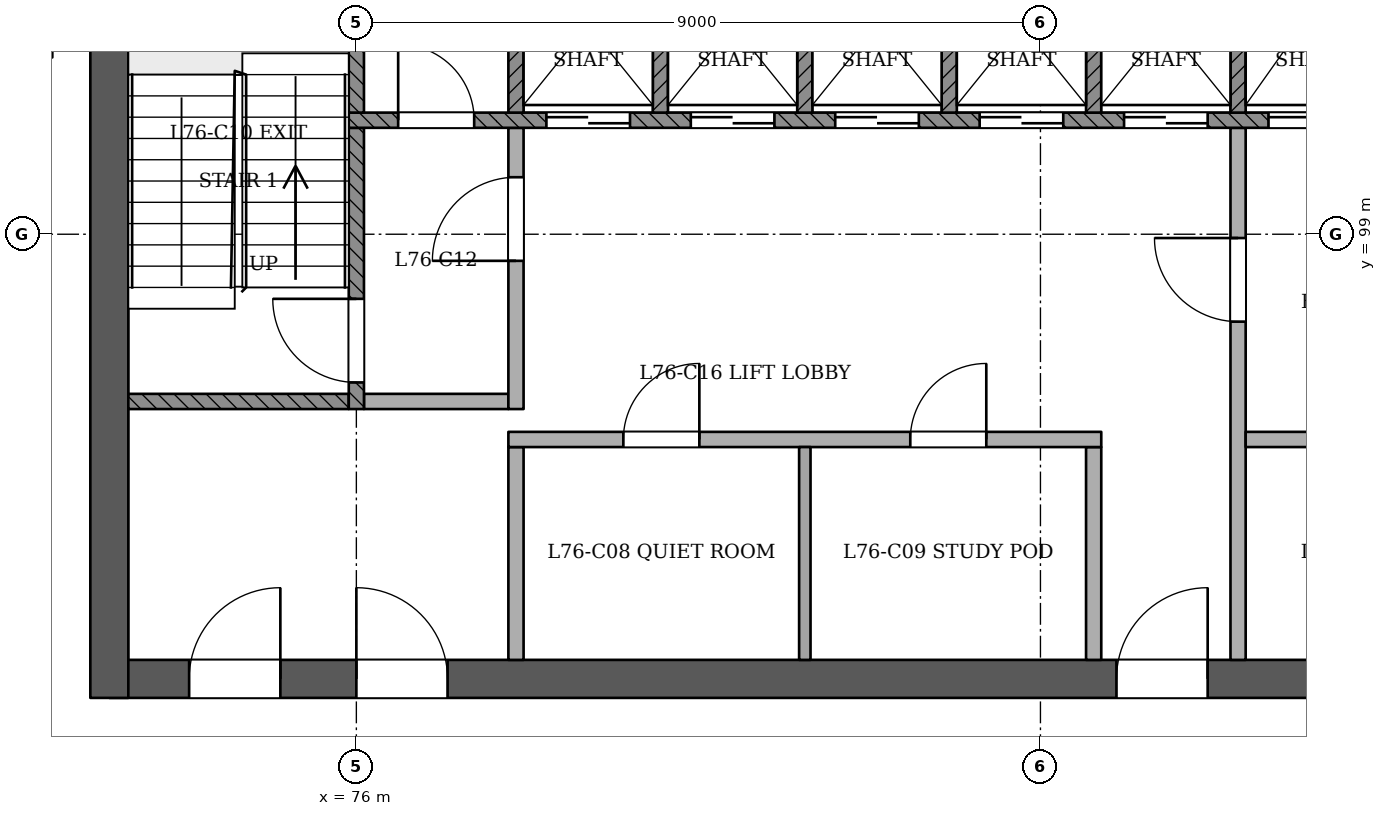
"""IFC4 building model, lengths in metres.
Left out: names, types, materials, properties, quantities, classifications, styles, units other than length and angle.
Written with IfcOpenShell. Run it as: python <this file> out.ifc"""

import sys

from ifc_helpers import new_model, si_unit, direction, frame, frame_2d, origin, place, context, subcontext, project, spatial, rectangle, extrude, element, fill, save


model = new_model("IFC4")
c1 = context("Model", 3, precision=1e-05, world=origin(), true_north=direction((0.0, 1.0)))
c2 = subcontext(c1, "Body", "Model", "MODEL_VIEW")
j1 = project(units=[si_unit("LENGTHUNIT", "METRE"), si_unit("PLANEANGLEUNIT", "RADIAN")], contexts=[c1])
p1 = place(None, origin())
s1 = spatial("IfcSite", under=j1, at=p1, CompositionType="ELEMENT")
p2 = place(p1, origin())
s2 = spatial("IfcBuilding", under=s1, at=p2, CompositionType="ELEMENT")
p3 = place(p2, frame((0.0, 0.0, 295.0)))
s3 = spatial("IfcBuildingStorey", under=s2, at=p3, CompositionType="ELEMENT", Elevation=295.0)
p4 = place(p3, frame((72.75, 93.15, 0.0), z_axis=(0.0, 0.0, 1.0), x_axis=(1.0, 0.0, 0.0)))
e1 = element("IfcWall", 1, at=p4, inside=s3, PredefinedType="SHEAR", context=c2, shape_type="SweptSolid", body=[
    extrude(rectangle(XDim=24.75, YDim=0.5, at=frame_2d((12.375, 0.0))), origin(), (0.0, 0.0, 1.0), 3.6),
])
p5 = place(p4, frame((1.05, 0.0, 0.0)))
e2 = element("IfcOpeningElement", 2, at=p5, cuts=e1, PredefinedType="OPENING", context=c2, shape_type="SweptSolid", body=[
    extrude(rectangle(XDim=1.2, YDim=2.1, at=frame_2d((0.6, 1.05))), frame((0.0, 0.26, 0.0), z_axis=(0.0, -1.0, 0.0), x_axis=(1.0, 0.0, 0.0)), (0.0, 0.0, 1.0), 0.521),
])
p6 = place(p4, frame((3.25, 0.0, 0.0)))
e3 = element("IfcOpeningElement", 3, at=p6, cuts=e1, PredefinedType="OPENING", context=c2, shape_type="SweptSolid", body=[
    extrude(rectangle(XDim=1.2, YDim=2.1, at=frame_2d((0.6, 1.05))), frame((0.0, 0.26, 0.0), z_axis=(0.0, -1.0, 0.0), x_axis=(1.0, 0.0, 0.0)), (0.0, 0.0, 1.0), 0.521),
])
p7 = place(p4, frame((13.25, 0.0, 0.0)))
e4 = element("IfcOpeningElement", 4, at=p7, cuts=e1, PredefinedType="OPENING", context=c2, shape_type="SweptSolid", body=[
    extrude(rectangle(XDim=1.2, YDim=2.1, at=frame_2d((0.6, 1.05))), frame((0.0, 0.26, 0.0), z_axis=(0.0, -1.0, 0.0), x_axis=(1.0, 0.0, 0.0)), (0.0, 0.0, 1.0), 0.521),
])
p8 = place(p4, frame((16.663, 0.0, 0.0)))
e5 = element("IfcOpeningElement", 5, at=p8, cuts=e1, PredefinedType="OPENING", context=c2, shape_type="SweptSolid", body=[
    extrude(rectangle(XDim=1.0, YDim=2.1, at=frame_2d((0.5, 1.05))), frame((0.0, 0.26, 0.0), z_axis=(0.0, -1.0, 0.0), x_axis=(1.0, 0.0, 0.0)), (0.0, 0.0, 1.0), 0.521),
])
p9 = place(p4, frame((20.55, 0.0, 0.0)))
e6 = element("IfcOpeningElement", 6, at=p9, cuts=e1, PredefinedType="OPENING", context=c2, shape_type="SweptSolid", body=[
    extrude(rectangle(XDim=1.0, YDim=2.1, at=frame_2d((0.5, 1.05))), frame((0.0, 0.26, 0.0), z_axis=(0.0, -1.0, 0.0), x_axis=(1.0, 0.0, 0.0)), (0.0, 0.0, 1.0), 0.521),
])
p10 = place(p4, frame((22.988, 0.0, 0.0)))
e7 = element("IfcOpeningElement", 7, at=p10, cuts=e1, PredefinedType="OPENING", context=c2, shape_type="SweptSolid", body=[
    extrude(rectangle(XDim=1.0, YDim=2.1, at=frame_2d((0.5, 1.05))), frame((0.0, 0.26, 0.0), z_axis=(0.0, -1.0, 0.0), x_axis=(1.0, 0.0, 0.0)), (0.0, 0.0, 1.0), 0.521),
])
p11 = place(p3, frame((72.75, 103.65, 0.0), z_axis=(0.0, 0.0, 1.0), x_axis=(0.0, -1.0, 0.0)))
e8 = element("IfcWall", 8, at=p11, inside=s3, PredefinedType="SHEAR", context=c2, shape_type="SweptSolid", body=[
    extrude(rectangle(XDim=10.75, YDim=0.5, at=frame_2d((5.375, 0.0))), origin(), (0.0, 0.0, 1.0), 3.6),
])
p12 = place(p3, frame((72.0, 101.401, 0.0), z_axis=(0.0, 0.0, 1.0), x_axis=(-0.999999989991, -0.000141482738, 0.0)))
e9 = element("IfcWall", 9, at=p12, inside=s3, PredefinedType="PARTITIONING", context=c2, shape_type="SweptSolid", body=[
    extrude(rectangle(XDim=1.726, YDim=0.15, at=frame_2d((0.863, 0.0))), origin(), (0.0, 0.0, 1.0), 3.2),
])
p13 = place(p3, frame((78.1, 93.4, 0.0), z_axis=(0.0, 0.0, 1.0), x_axis=(0.0, 1.0, 0.0)))
e10 = element("IfcWall", 10, at=p13, inside=s3, PredefinedType="PARTITIONING", context=c2, shape_type="SweptSolid", body=[
    extrude(rectangle(XDim=2.8, YDim=0.2, at=frame_2d((1.4, 0.0))), origin(), (0.0, 0.0, 1.0), 3.2),
])
p14 = place(p3, frame((81.9, 93.4, 0.0), z_axis=(0.0, 0.0, 1.0), x_axis=(0.0, 1.0, 0.0)))
e11 = element("IfcWall", 11, at=p14, inside=s3, PredefinedType="PARTITIONING", context=c2, shape_type="SweptSolid", body=[
    extrude(rectangle(XDim=2.8, YDim=0.15, at=frame_2d((1.4, 0.0))), origin(), (0.0, 0.0, 1.0), 3.2),
])
p15 = place(p3, frame((85.7, 93.4, 0.0), z_axis=(0.0, 0.0, 1.0), x_axis=(0.0, 1.0, 0.0)))
e12 = element("IfcWall", 12, at=p15, inside=s3, PredefinedType="PARTITIONING", context=c2, shape_type="SweptSolid", body=[
    extrude(rectangle(XDim=2.8, YDim=0.2, at=frame_2d((1.4, 0.0))), origin(), (0.0, 0.0, 1.0), 3.2),
])
p16 = place(p3, frame((87.6, 93.4, 0.0), z_axis=(0.0, 0.0, 1.0), x_axis=(0.0, 1.0, 0.0)))
e13 = element("IfcWall", 13, at=p16, inside=s3, PredefinedType="PARTITIONING", context=c2, shape_type="SweptSolid", body=[
    extrude(rectangle(XDim=7.0, YDim=0.2, at=frame_2d((3.5, 0.0))), origin(), (0.0, 0.0, 1.0), 3.2),
])
p17 = place(p16, frame((4.45, 0.0, 0.0)))
e14 = element("IfcOpeningElement", 14, at=p17, cuts=e13, PredefinedType="OPENING", context=c2, shape_type="SweptSolid", body=[
    extrude(rectangle(XDim=1.1, YDim=2.1, at=frame_2d((0.55, 1.05))), frame((0.0, 0.11, 0.0), z_axis=(0.0, -1.0, 0.0), x_axis=(1.0, 0.0, 0.0)), (0.0, 0.0, 1.0), 0.221),
])
p18 = place(p3, frame((78.0, 96.3, 0.0), z_axis=(0.0, 0.0, 1.0), x_axis=(1.0, 0.0, 0.0)))
e15 = element("IfcWall", 15, at=p18, inside=s3, PredefinedType="PARTITIONING", context=c2, shape_type="SweptSolid", body=[
    extrude(rectangle(XDim=7.8, YDim=0.2, at=frame_2d((3.9, 0.0))), origin(), (0.0, 0.0, 1.0), 3.2),
])
p19 = place(p18, frame((1.512, 0.0, 0.0)))
e16 = element("IfcOpeningElement", 16, at=p19, cuts=e15, PredefinedType="OPENING", context=c2, shape_type="SweptSolid", body=[
    extrude(rectangle(XDim=1.0, YDim=2.1, at=frame_2d((0.5, 1.05))), frame((0.0, 0.11, 0.0), z_axis=(0.0, -1.0, 0.0), x_axis=(1.0, 0.0, 0.0)), (0.0, 0.0, 1.0), 0.221),
])
p20 = place(p18, frame((5.288, 0.0, 0.0)))
e17 = element("IfcOpeningElement", 17, at=p20, cuts=e15, PredefinedType="OPENING", context=c2, shape_type="SweptSolid", body=[
    extrude(rectangle(XDim=1.0, YDim=2.1, at=frame_2d((0.5, 1.05))), frame((0.0, 0.11, 0.0), z_axis=(0.0, -1.0, 0.0), x_axis=(1.0, 0.0, 0.0)), (0.0, 0.0, 1.0), 0.221),
])
p21 = place(p3, frame((87.7, 96.3, 0.0), z_axis=(0.0, 0.0, 1.0), x_axis=(1.0, 0.0, 0.0)))
e18 = element("IfcWall", 18, at=p21, inside=s3, PredefinedType="PARTITIONING", context=c2, shape_type="SweptSolid", body=[
    extrude(rectangle(XDim=3.6, YDim=0.2, at=frame_2d((1.8, 0.0))), origin(), (0.0, 0.0, 1.0), 3.2),
])
p22 = place(p3, frame((73.0, 96.8, 0.0), z_axis=(0.0, 0.0, 1.0), x_axis=(1.0, 0.0, 0.0)))
e19 = element("IfcWall", 19, at=p22, inside=s3, PredefinedType="SOLIDWALL", context=c2, shape_type="SweptSolid", body=[
    extrude(rectangle(XDim=2.9, YDim=0.2, at=frame_2d((1.45, 0.0))), origin(), (0.0, 0.0, 1.0), 3.2),
])
p23 = place(p3, frame((76.0, 96.7, 0.0), z_axis=(0.0, 0.0, 1.0), x_axis=(0.0, 1.0, 0.0)))
e20 = element("IfcWall", 20, at=p23, inside=s3, PredefinedType="SOLIDWALL", context=c2, shape_type="SweptSolid", body=[
    extrude(rectangle(XDim=3.7, YDim=0.2, at=frame_2d((1.85, 0.0))), origin(), (0.0, 0.0, 1.0), 3.2),
])
p24 = place(p23, frame((0.35, 0.0, 0.0)))
e21 = element("IfcOpeningElement", 21, at=p24, cuts=e20, PredefinedType="OPENING", context=c2, shape_type="SweptSolid", body=[
    extrude(rectangle(XDim=1.1, YDim=2.1, at=frame_2d((0.55, 1.05))), frame((0.0, 0.11, 0.0), z_axis=(0.0, -1.0, 0.0), x_axis=(1.0, 0.0, 0.0)), (0.0, 0.0, 1.0), 0.221),
])
p25 = place(p3, frame((76.1, 96.8, 0.0), z_axis=(0.0, 0.0, 1.0), x_axis=(1.0, 0.0, 0.0)))
e22 = element("IfcWall", 22, at=p25, inside=s3, PredefinedType="PARTITIONING", context=c2, shape_type="SweptSolid", body=[
    extrude(rectangle(XDim=1.9, YDim=0.2, at=frame_2d((0.95, 0.0))), origin(), (0.0, 0.0, 1.0), 3.2),
])
p26 = place(p3, frame((78.1, 96.7, 0.0), z_axis=(0.0, 0.0, 1.0), x_axis=(0.0, 1.0, 0.0)))
e23 = element("IfcWall", 23, at=p26, inside=s3, PredefinedType="PARTITIONING", context=c2, shape_type="SweptSolid", body=[
    extrude(rectangle(XDim=3.7, YDim=0.2, at=frame_2d((1.85, 0.0))), origin(), (0.0, 0.0, 1.0), 3.2),
])
p27 = place(p26, frame((1.95, 0.0, 0.0)))
e24 = element("IfcOpeningElement", 24, at=p27, cuts=e23, PredefinedType="OPENING", context=c2, shape_type="SweptSolid", body=[
    extrude(rectangle(XDim=1.1, YDim=2.1, at=frame_2d((0.55, 1.05))), frame((0.0, 0.11, 0.0), z_axis=(0.0, -1.0, 0.0), x_axis=(1.0, 0.0, 0.0)), (0.0, 0.0, 1.0), 0.221),
])
p28 = place(p3, frame((75.9, 100.5, 0.0), z_axis=(0.0, 0.0, 1.0), x_axis=(1.0, 0.0, 0.0)))
e25 = element("IfcWall", 25, at=p28, inside=s3, PredefinedType="SOLIDWALL", context=c2, shape_type="SweptSolid", body=[
    extrude(rectangle(XDim=18.2, YDim=0.2, at=frame_2d((9.1, 0.0))), origin(), (0.0, 0.0, 1.0), 3.2),
])
p29 = place(p28, frame((2.6, 0.0, 0.0)))
e26 = element("IfcOpeningElement", 26, at=p29, cuts=e25, PredefinedType="OPENING", context=c2, shape_type="SweptSolid", body=[
    extrude(rectangle(XDim=1.1, YDim=2.1, at=frame_2d((0.55, 1.05))), frame((0.0, 0.11, 0.0), z_axis=(0.0, -1.0, 0.0), x_axis=(1.0, 0.0, 0.0)), (0.0, 0.0, 1.0), 0.221),
])
p30 = place(p28, frame((4.5, 0.0, 0.0)))
e27 = element("IfcOpeningElement", 27, at=p30, cuts=e25, PredefinedType="OPENING", context=c2, shape_type="SweptSolid", body=[
    extrude(rectangle(XDim=1.1, YDim=2.1, at=frame_2d((0.55, 1.05))), frame((0.0, 0.11, 0.0), z_axis=(0.0, -1.0, 0.0), x_axis=(1.0, 0.0, 0.0)), (0.0, 0.0, 1.0), 0.221),
])
p31 = place(p28, frame((6.4, 0.0, 0.0)))
e28 = element("IfcOpeningElement", 28, at=p31, cuts=e25, PredefinedType="OPENING", context=c2, shape_type="SweptSolid", body=[
    extrude(rectangle(XDim=1.1, YDim=2.1, at=frame_2d((0.55, 1.05))), frame((0.0, 0.11, 0.0), z_axis=(0.0, -1.0, 0.0), x_axis=(1.0, 0.0, 0.0)), (0.0, 0.0, 1.0), 0.221),
])
p32 = place(p28, frame((8.3, 0.0, 0.0)))
e29 = element("IfcOpeningElement", 29, at=p32, cuts=e25, PredefinedType="OPENING", context=c2, shape_type="SweptSolid", body=[
    extrude(rectangle(XDim=1.1, YDim=2.1, at=frame_2d((0.55, 1.05))), frame((0.0, 0.11, 0.0), z_axis=(0.0, -1.0, 0.0), x_axis=(1.0, 0.0, 0.0)), (0.0, 0.0, 1.0), 0.221),
])
p33 = place(p28, frame((10.2, 0.0, 0.0)))
e30 = element("IfcOpeningElement", 30, at=p33, cuts=e25, PredefinedType="OPENING", context=c2, shape_type="SweptSolid", body=[
    extrude(rectangle(XDim=1.1, YDim=2.1, at=frame_2d((0.55, 1.05))), frame((0.0, 0.11, 0.0), z_axis=(0.0, -1.0, 0.0), x_axis=(1.0, 0.0, 0.0)), (0.0, 0.0, 1.0), 0.221),
])
p34 = place(p28, frame((12.1, 0.0, 0.0)))
e31 = element("IfcOpeningElement", 31, at=p34, cuts=e25, PredefinedType="OPENING", context=c2, shape_type="SweptSolid", body=[
    extrude(rectangle(XDim=1.1, YDim=2.1, at=frame_2d((0.55, 1.05))), frame((0.0, 0.11, 0.0), z_axis=(0.0, -1.0, 0.0), x_axis=(1.0, 0.0, 0.0)), (0.0, 0.0, 1.0), 0.221),
])
p35 = place(p28, frame((14.0, 0.0, 0.0)))
e32 = element("IfcOpeningElement", 32, at=p35, cuts=e25, PredefinedType="OPENING", context=c2, shape_type="SweptSolid", body=[
    extrude(rectangle(XDim=1.1, YDim=2.1, at=frame_2d((0.55, 1.05))), frame((0.0, 0.11, 0.0), z_axis=(0.0, -1.0, 0.0), x_axis=(1.0, 0.0, 0.0)), (0.0, 0.0, 1.0), 0.221),
])
p36 = place(p28, frame((0.65, 0.0, 0.0)))
e33 = element("IfcOpeningElement", 33, at=p36, cuts=e25, PredefinedType="OPENING", context=c2, shape_type="SweptSolid", body=[
    extrude(rectangle(XDim=1.0, YDim=2.1, at=frame_2d((0.5, 1.05))), frame((0.0, 0.11, 0.0), z_axis=(0.0, -1.0, 0.0), x_axis=(1.0, 0.0, 0.0)), (0.0, 0.0, 1.0), 0.221),
])
p37 = place(p28, frame((16.3, 0.0, 0.0)))
e34 = element("IfcOpeningElement", 34, at=p37, cuts=e25, PredefinedType="OPENING", context=c2, shape_type="SweptSolid", body=[
    extrude(rectangle(XDim=1.0, YDim=2.1, at=frame_2d((0.5, 1.05))), frame((0.0, 0.11, 0.0), z_axis=(0.0, -1.0, 0.0), x_axis=(1.0, 0.0, 0.0)), (0.0, 0.0, 1.0), 0.221),
])
for number, where, z_axis, x_axis in (
    (35, (76.0, 100.6, 0.0), (0.0, 0.0, 1.0), (0.0, 1.0, 0.0)),
    (36, (78.1, 100.6, 0.0), (0.0, 0.0, 1.0), (0.0, 1.0, 0.0)),
    (37, (80.0, 100.6, 0.0), (0.0, 0.0, 1.0), (0.0, 1.0, 0.0)),
    (38, (81.9, 100.6, 0.0), (0.0, 0.0, 1.0), (0.0, 1.0, 0.0)),
    (39, (83.8, 100.6, 0.0), (0.0, 0.0, 1.0), (0.0, 1.0, 0.0)),
    (40, (85.7, 100.6, 0.0), (0.0, 0.0, 1.0), (0.0, 1.0, 0.0)),
    (41, (87.6, 100.6, 0.0), (0.0, 0.0, 1.0), (0.0, 1.0, 0.0)),
):
    element("IfcWall", number, at=place(p3, frame(where, z_axis=z_axis, x_axis=x_axis)), inside=s3, PredefinedType="SOLIDWALL", context=c2, shape_type="SweptSolid", body=[
        extrude(rectangle(XDim=2.8, YDim=0.2, at=frame_2d((1.4, 0.0))), origin(), (0.0, 0.0, 1.0), 3.2),
    ])
p38 = place(p29, origin())
e42 = element("IfcDoor", 42, at=p38, inside=s3, OperationType="SLIDING_TO_RIGHT", PredefinedType="NOTDEFINED", context=c2, shape_type="SweptSolid", body=[
    extrude(rectangle(XDim=1.1, YDim=2.1, at=frame_2d((0.55, 1.05))), frame((0.0, 0.025, 0.0), z_axis=(0.0, -1.0, 0.0), x_axis=(1.0, 0.0, 0.0)), (0.0, 0.0, 1.0), 0.05),
])
fill(e26, e42)
p39 = place(p30, origin())
e43 = element("IfcDoor", 43, at=p39, inside=s3, OperationType="SLIDING_TO_LEFT", PredefinedType="NOTDEFINED", context=c2, shape_type="SweptSolid", body=[
    extrude(rectangle(XDim=1.1, YDim=2.1, at=frame_2d((0.55, 1.05))), frame((0.0, 0.025, 0.0), z_axis=(0.0, -1.0, 0.0), x_axis=(1.0, 0.0, 0.0)), (0.0, 0.0, 1.0), 0.05),
])
fill(e27, e43)
p40 = place(p31, origin())
e44 = element("IfcDoor", 44, at=p40, inside=s3, OperationType="SLIDING_TO_RIGHT", PredefinedType="NOTDEFINED", context=c2, shape_type="SweptSolid", body=[
    extrude(rectangle(XDim=1.1, YDim=2.1, at=frame_2d((0.55, 1.05))), frame((0.0, 0.025, 0.0), z_axis=(0.0, -1.0, 0.0), x_axis=(1.0, 0.0, 0.0)), (0.0, 0.0, 1.0), 0.05),
])
fill(e28, e44)
p41 = place(p32, origin())
e45 = element("IfcDoor", 45, at=p41, inside=s3, OperationType="SLIDING_TO_LEFT", PredefinedType="NOTDEFINED", context=c2, shape_type="SweptSolid", body=[
    extrude(rectangle(XDim=1.1, YDim=2.1, at=frame_2d((0.55, 1.05))), frame((0.0, 0.025, 0.0), z_axis=(0.0, -1.0, 0.0), x_axis=(1.0, 0.0, 0.0)), (0.0, 0.0, 1.0), 0.05),
])
fill(e29, e45)
p42 = place(p33, origin())
e46 = element("IfcDoor", 46, at=p42, inside=s3, OperationType="SLIDING_TO_RIGHT", PredefinedType="NOTDEFINED", context=c2, shape_type="SweptSolid", body=[
    extrude(rectangle(XDim=1.1, YDim=2.1, at=frame_2d((0.55, 1.05))), frame((0.0, 0.025, 0.0), z_axis=(0.0, -1.0, 0.0), x_axis=(1.0, 0.0, 0.0)), (0.0, 0.0, 1.0), 0.05),
])
fill(e30, e46)
p43 = place(p34, origin())
e47 = element("IfcDoor", 47, at=p43, inside=s3, OperationType="SLIDING_TO_RIGHT", PredefinedType="NOTDEFINED", context=c2, shape_type="SweptSolid", body=[
    extrude(rectangle(XDim=1.1, YDim=2.1, at=frame_2d((0.55, 1.05))), frame((0.0, 0.025, 0.0), z_axis=(0.0, -1.0, 0.0), x_axis=(1.0, 0.0, 0.0)), (0.0, 0.0, 1.0), 0.05),
])
fill(e31, e47)
p44 = place(p24, origin())
e48 = element("IfcDoor", 48, at=p44, inside=s3, OperationType="SINGLE_SWING_RIGHT", PredefinedType="NOTDEFINED", context=c2, shape_type="SweptSolid", body=[
    extrude(rectangle(XDim=1.1, YDim=2.1, at=frame_2d((0.55, 1.05))), frame((0.0, 0.025, 0.0), z_axis=(0.0, -1.0, 0.0), x_axis=(1.0, 0.0, 0.0)), (0.0, 0.0, 1.0), 0.05),
])
fill(e21, e48)
p45 = place(p27, origin())
e49 = element("IfcDoor", 49, at=p45, inside=s3, OperationType="SINGLE_SWING_LEFT", PredefinedType="NOTDEFINED", context=c2, shape_type="SweptSolid", body=[
    extrude(rectangle(XDim=1.1, YDim=2.1, at=frame_2d((0.55, 1.05))), frame((0.0, 0.025, 0.0), z_axis=(0.0, -1.0, 0.0), x_axis=(1.0, 0.0, 0.0)), (0.0, 0.0, 1.0), 0.05),
])
fill(e24, e49)
p46 = place(p17, origin())
e50 = element("IfcDoor", 50, at=p46, inside=s3, OperationType="SINGLE_SWING_RIGHT", PredefinedType="NOTDEFINED", context=c2, shape_type="SweptSolid", body=[
    extrude(rectangle(XDim=1.1, YDim=2.1, at=frame_2d((0.55, 1.05))), frame((0.0, 0.025, 0.0), z_axis=(0.0, -1.0, 0.0), x_axis=(1.0, 0.0, 0.0)), (0.0, 0.0, 1.0), 0.05),
])
fill(e14, e50)
p47 = place(p5, origin())
e51 = element("IfcDoor", 51, at=p47, inside=s3, OperationType="SINGLE_SWING_RIGHT", PredefinedType="NOTDEFINED", context=c2, shape_type="SweptSolid", body=[
    extrude(rectangle(XDim=1.2, YDim=2.1, at=frame_2d((0.6, 1.05))), frame((0.0, 0.025, 0.0), z_axis=(0.0, -1.0, 0.0), x_axis=(1.0, 0.0, 0.0)), (0.0, 0.0, 1.0), 0.05),
])
fill(e2, e51)
p48 = place(p6, origin())
e52 = element("IfcDoor", 52, at=p48, inside=s3, OperationType="SINGLE_SWING_LEFT", PredefinedType="NOTDEFINED", context=c2, shape_type="SweptSolid", body=[
    extrude(rectangle(XDim=1.2, YDim=2.1, at=frame_2d((0.6, 1.05))), frame((0.0, 0.025, 0.0), z_axis=(0.0, -1.0, 0.0), x_axis=(1.0, 0.0, 0.0)), (0.0, 0.0, 1.0), 0.05),
])
fill(e3, e52)
p49 = place(p7, origin())
e53 = element("IfcDoor", 53, at=p49, inside=s3, OperationType="SINGLE_SWING_RIGHT", PredefinedType="NOTDEFINED", context=c2, shape_type="SweptSolid", body=[
    extrude(rectangle(XDim=1.2, YDim=2.1, at=frame_2d((0.6, 1.05))), frame((0.0, 0.025, 0.0), z_axis=(0.0, -1.0, 0.0), x_axis=(1.0, 0.0, 0.0)), (0.0, 0.0, 1.0), 0.05),
])
fill(e4, e53)
p50 = place(p36, origin())
e54 = element("IfcDoor", 54, at=p50, inside=s3, OperationType="SINGLE_SWING_LEFT", PredefinedType="NOTDEFINED", context=c2, shape_type="SweptSolid", body=[
    extrude(rectangle(XDim=1.0, YDim=2.1, at=frame_2d((0.5, 1.05))), frame((0.0, 0.025, 0.0), z_axis=(0.0, -1.0, 0.0), x_axis=(1.0, 0.0, 0.0)), (0.0, 0.0, 1.0), 0.05),
])
fill(e33, e54)
p51 = place(p19, origin())
e55 = element("IfcDoor", 55, at=p51, inside=s3, OperationType="SINGLE_SWING_RIGHT", PredefinedType="NOTDEFINED", context=c2, shape_type="SweptSolid", body=[
    extrude(rectangle(XDim=1.0, YDim=2.1, at=frame_2d((0.5, 1.05))), frame((0.0, 0.025, 0.0), z_axis=(0.0, -1.0, 0.0), x_axis=(1.0, 0.0, 0.0)), (0.0, 0.0, 1.0), 0.05),
])
fill(e16, e55)
p52 = place(p20, origin())
e56 = element("IfcDoor", 56, at=p52, inside=s3, OperationType="SINGLE_SWING_RIGHT", PredefinedType="NOTDEFINED", context=c2, shape_type="SweptSolid", body=[
    extrude(rectangle(XDim=1.0, YDim=2.1, at=frame_2d((0.5, 1.05))), frame((0.0, 0.025, 0.0), z_axis=(0.0, -1.0, 0.0), x_axis=(1.0, 0.0, 0.0)), (0.0, 0.0, 1.0), 0.05),
])
fill(e17, e56)
save(model, sys.argv[1])
